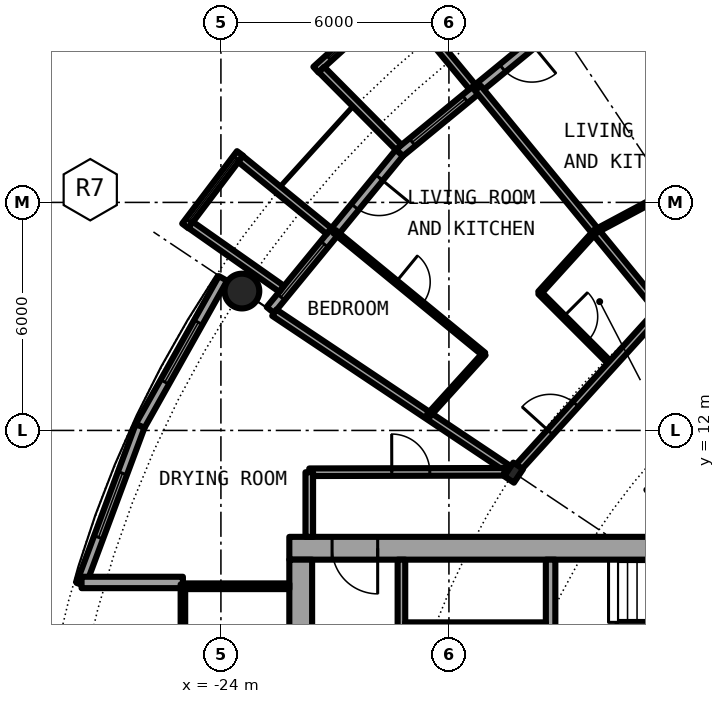
"""IFC4 building model, lengths in metres.
Left out: names, types, materials, properties, quantities, classifications, styles, units other than length and angle.
Written with IfcOpenShell. Run it as: python <this file> out.ifc"""

import sys

from ifc_helpers import new_model, si_unit, direction, frame, frame_2d, origin, origin_2d, place, context, subcontext, project, spatial, rectangle, circle, hollow_circle, i_section, extrude, element, fill, save


model = new_model("IFC4")
c1 = context("Model", 3, precision=1e-05, world=origin(), true_north=direction((0.0, 1.0)))
c2 = subcontext(c1, "Body", "Model", "MODEL_VIEW")
j1 = project(units=[si_unit("LENGTHUNIT", "METRE"), si_unit("PLANEANGLEUNIT", "RADIAN")], contexts=[c1])
p1 = place(None, origin())
s1 = spatial("IfcSite", under=j1, at=p1, CompositionType="ELEMENT")
p2 = place(p1, origin())
s2 = spatial("IfcBuilding", under=s1, at=p2, CompositionType="ELEMENT")
p3 = place(p2, frame((0.0, 0.0, 123.85)))
s3 = spatial("IfcBuildingStorey", under=s2, at=p3, CompositionType="ELEMENT", Elevation=123.85)
p4 = place(p3, frame((-23.448, 15.667, 0.0), z_axis=(0.0, 0.0, 1.0), x_axis=(1.0, 0.0, 0.0)))
e1 = element("IfcColumn", 1, at=p4, inside=s3, PredefinedType="COLUMN", context=c2, shape_type="SweptSolid", body=[
    extrude(hollow_circle(Radius=0.457, WallThickness=0.04, at=origin_2d()), origin(), (0.0, 0.0, 1.0), 3.05),
])
p5 = place(p3, frame((-16.297, 10.889, 0.0), z_axis=(0.0, 0.0, 1.0), x_axis=(-0.831469612303, 0.55557023302, 0.0)))
e2 = element("IfcColumn", 2, at=p5, inside=s3, PredefinedType="COLUMN", context=c2, shape_type="SweptSolid", body=[
    extrude(i_section(OverallWidth=0.307, OverallDepth=0.432, WebThickness=0.021, FlangeThickness=0.04, FilletRadius=0.027, at=origin_2d()), origin(), (0.0, 0.0, 1.0), 3.05),
])
p6 = place(p3, frame((-15.167, 22.699, 0.0), z_axis=(0.0, 0.0, 1.0), x_axis=(-0.773019449054, -0.634382322723, 0.0)))
e3 = element("IfcWall", 3, at=p6, inside=s3, PredefinedType="SOLIDWALL", context=c2, shape_type="SweptSolid", body=[
    extrude(rectangle(XDim=5.352, YDim=0.25, at=frame_2d((2.676, 0.0))), origin(), (0.0, 0.0, 1.0), 2.7),
])
p7 = place(p6, frame((0.841, 0.0, 0.0)))
e4 = element("IfcOpeningElement", 4, at=p7, cuts=e3, PredefinedType="OPENING", context=c2, shape_type="SweptSolid", body=[
    extrude(rectangle(XDim=1.0, YDim=2.2, at=frame_2d((0.5, 1.1))), frame((0.0, 0.135, 0.0), z_axis=(0.0, -1.0, 0.0), x_axis=(1.0, 0.0, 0.0)), (0.0, 0.0, 1.0), 0.27),
])
p8 = place(p6, frame((3.111, 0.0, 0.3)))
e5 = element("IfcOpeningElement", 5, at=p8, cuts=e3, PredefinedType="OPENING", context=c2, shape_type="SweptSolid", body=[
    extrude(rectangle(XDim=1.8, YDim=2.1, at=frame_2d((0.9, 1.05))), frame((0.0, 0.135, 0.0), z_axis=(0.0, -1.0, 0.0), x_axis=(1.0, 0.0, 0.0)), (0.0, 0.0, 1.0), 0.27),
])
p9 = place(p3, frame((-19.282, 23.503, -0.03), z_axis=(0.0, 0.0, 1.0), x_axis=(-0.740998365753, -0.671506829416, 0.0)))
e6 = element("IfcWall", 6, at=p9, inside=s3, PredefinedType="SOLIDWALL", context=c2, shape_type="SweptSolid", body=[
    extrude(rectangle(XDim=2.993, YDim=0.2, at=frame_2d((1.497, 0.0))), origin(), (0.0, 0.0, 1.0), 2.73),
])
p10 = place(p9, frame((0.457, 0.0, 0.33)))
e7 = element("IfcOpeningElement", 7, at=p10, cuts=e6, PredefinedType="OPENING", context=c2, shape_type="SweptSolid", body=[
    extrude(circle(Radius=1.04, at=frame_2d((1.04, 1.04))), frame((0.0, 0.11, 0.0), z_axis=(0.0, -1.0, 0.0), x_axis=(1.0, 0.0, 0.0)), (0.0, 0.0, 1.0), 0.22),
])
p11 = place(p3, frame((-17.384, 21.041, -0.03), z_axis=(0.0, 0.0, 1.0), x_axis=(-0.63709551667, 0.770784861449, 0.0)))
e8 = element("IfcWall", 8, at=p11, inside=s3, PredefinedType="SOLIDWALL", context=c2, shape_type="SweptSolid", body=[
    extrude(rectangle(XDim=3.006, YDim=0.2, at=frame_2d((1.503, 0.0))), origin(), (0.0, 0.0, 1.0), 2.73),
])
p12 = place(p3, frame((-19.323, 19.45, -0.03), z_axis=(0.0, 0.0, 1.0), x_axis=(-0.704476739375, 0.709727076896, 0.0)))
e9 = element("IfcWall", 9, at=p12, inside=s3, PredefinedType="SOLIDWALL", context=c2, shape_type="SweptSolid", body=[
    extrude(rectangle(XDim=2.883, YDim=0.2, at=frame_2d((1.441, 0.0))), origin(), (0.0, 0.0, 1.0), 2.73),
])
p13 = place(p3, frame((-19.304, 19.304, 0.0), z_axis=(0.0, 0.0, 1.0), x_axis=(-0.634382322723, -0.773019449054, 0.0)))
e10 = element("IfcWall", 10, at=p13, inside=s3, PredefinedType="SOLIDWALL", context=c2, shape_type="SweptSolid", body=[
    extrude(rectangle(XDim=5.352, YDim=0.25, at=frame_2d((2.676, 0.0))), origin(), (0.0, 0.0, 1.0), 2.7),
])
p14 = place(p13, frame((0.841, 0.0, 0.0)))
e11 = element("IfcOpeningElement", 11, at=p14, cuts=e10, PredefinedType="OPENING", context=c2, shape_type="SweptSolid", body=[
    extrude(rectangle(XDim=1.0, YDim=2.2, at=frame_2d((0.5, 1.1))), frame((0.0, 0.135, 0.0), z_axis=(0.0, -1.0, 0.0), x_axis=(1.0, 0.0, 0.0)), (0.0, 0.0, 1.0), 0.27),
])
p15 = place(p13, frame((3.111, 0.0, 0.3)))
e12 = element("IfcOpeningElement", 12, at=p15, cuts=e10, PredefinedType="OPENING", context=c2, shape_type="SweptSolid", body=[
    extrude(rectangle(XDim=1.8, YDim=2.1, at=frame_2d((0.9, 1.05))), frame((0.0, 0.135, 0.0), z_axis=(0.0, -1.0, 0.0), x_axis=(1.0, 0.0, 0.0)), (0.0, 0.0, 1.0), 0.27),
])
p16 = place(p3, frame((-23.497, 19.289, -0.03), z_axis=(0.0, 0.0, 1.0), x_axis=(-0.603375996329, -0.797456837111, 0.0)))
e13 = element("IfcWall", 13, at=p16, inside=s3, PredefinedType="SOLIDWALL", context=c2, shape_type="SweptSolid", body=[
    extrude(rectangle(XDim=2.391, YDim=0.2, at=frame_2d((1.196, 0.0))), origin(), (0.0, 0.0, 1.0), 2.73),
])
p17 = place(p16, frame((0.156, 0.0, 0.33)))
e14 = element("IfcOpeningElement", 14, at=p17, cuts=e13, PredefinedType="OPENING", context=c2, shape_type="SweptSolid", body=[
    extrude(circle(Radius=1.04, at=frame_2d((1.04, 1.04))), frame((0.0, 0.11, 0.0), z_axis=(0.0, -1.0, 0.0), x_axis=(1.0, 0.0, 0.0)), (0.0, 0.0, 1.0), 0.22),
])
p18 = place(p3, frame((-21.155, 17.246, -0.03), z_axis=(0.0, 0.0, 1.0), x_axis=(-0.775179004516, 0.631741648902, 0.0)))
e15 = element("IfcWall", 15, at=p18, inside=s3, PredefinedType="SOLIDWALL", context=c2, shape_type="SweptSolid", body=[
    extrude(rectangle(XDim=3.006, YDim=0.2, at=frame_2d((1.503, 0.0))), origin(), (0.0, 0.0, 1.0), 2.73),
])
p19 = place(p3, frame((-22.402, 15.726, -0.03), z_axis=(0.0, 0.0, 1.0), x_axis=(-0.818275399393, 0.574826383135, 0.0)))
e16 = element("IfcWall", 16, at=p19, inside=s3, PredefinedType="SOLIDWALL", context=c2, shape_type="SweptSolid", body=[
    extrude(rectangle(XDim=2.929, YDim=0.2, at=frame_2d((1.465, 0.0))), origin(), (0.0, 0.0, 1.0), 2.73),
])
p20 = place(p3, frame((-23.946, 16.0, 0.0), z_axis=(0.0, 0.0, 1.0), x_axis=(-0.489696356642, -0.871893042919, 0.0)))
e17 = element("IfcWall", 17, at=p20, inside=s3, PredefinedType="SOLIDWALL", context=c2, shape_type="SweptSolid", body=[
    extrude(rectangle(XDim=4.454, YDim=0.25, at=frame_2d((2.227, 0.0))), origin(), (0.0, 0.0, 1.0), 2.7),
])
p21 = place(p20, frame((1.327, 0.0, 0.3)))
e18 = element("IfcOpeningElement", 18, at=p21, cuts=e17, PredefinedType="OPENING", context=c2, shape_type="SweptSolid", body=[
    extrude(rectangle(XDim=1.8, YDim=2.1, at=frame_2d((0.9, 1.05))), frame((0.0, 0.135, 0.0), z_axis=(0.0, -1.0, 0.0), x_axis=(1.0, 0.0, 0.0)), (0.0, 0.0, 1.0), 0.27),
])
p22 = place(p3, frame((-26.127, 12.117, 0.0), z_axis=(0.0, 0.0, 1.0), x_axis=(-0.349247811493, -0.937030397675, 0.0)))
e19 = element("IfcWall", 19, at=p22, inside=s3, PredefinedType="SOLIDWALL", context=c2, shape_type="SweptSolid", body=[
    extrude(rectangle(XDim=4.452, YDim=0.25, at=frame_2d((2.226, 0.0))), origin(), (0.0, 0.0, 1.0), 2.7),
])
p23 = place(p22, frame((1.327, 0.0, 0.3)))
e20 = element("IfcOpeningElement", 20, at=p23, cuts=e19, PredefinedType="OPENING", context=c2, shape_type="SweptSolid", body=[
    extrude(rectangle(XDim=1.8, YDim=2.1, at=frame_2d((0.9, 1.05))), frame((0.0, 0.135, 0.0), z_axis=(0.0, -1.0, 0.0), x_axis=(1.0, 0.0, 0.0)), (0.0, 0.0, 1.0), 0.27),
])
p24 = place(p3, frame((-25.0, 8.0, 0.0), z_axis=(0.0, 0.0, 1.0), x_axis=(-1.0, 0.0, 0.0)))
e21 = element("IfcWall", 21, at=p24, inside=s3, PredefinedType="SOLIDWALL", context=c2, shape_type="SweptSolid", body=[
    extrude(rectangle(XDim=2.667, YDim=0.3, at=frame_2d((1.333, 0.0))), origin(), (0.0, 0.0, 1.0), 2.7),
])
p25 = place(p3, frame((-8.4, 8.9, 0.0), z_axis=(0.0, 0.0, 1.0), x_axis=(-1.0, 0.0, 0.0)))
e22 = element("IfcWall", 22, at=p25, inside=s3, PredefinedType="SHEAR", context=c2, shape_type="SweptSolid", body=[
    extrude(rectangle(XDim=13.8, YDim=0.6, at=frame_2d((6.9, 0.0))), origin(), (0.0, 0.0, 1.0), 3.05),
])
p26 = place(p25, frame((11.475, 0.0, 0.0)))
e23 = element("IfcOpeningElement", 23, at=p26, cuts=e22, PredefinedType="OPENING", context=c2, shape_type="SweptSolid", body=[
    extrude(rectangle(XDim=1.2, YDim=2.3, at=frame_2d((0.6, 1.15))), frame((0.0, 0.31, 0.0), z_axis=(0.0, -1.0, 0.0), x_axis=(1.0, 0.0, 0.0)), (0.0, 0.0, 1.0), 0.62),
])
p27 = place(p3, frame((-21.9, -8.6, 0.0), z_axis=(0.0, 0.0, 1.0), x_axis=(0.0, 1.0, 0.0)))
e24 = element("IfcWall", 24, at=p27, inside=s3, PredefinedType="SHEAR", context=c2, shape_type="SweptSolid", body=[
    extrude(rectangle(XDim=17.2, YDim=0.6, at=frame_2d((8.6, 0.0))), origin(), (0.0, 0.0, 1.0), 3.05),
])
p28 = place(p27, frame((7.7, 0.0, 0.0)))
e25 = element("IfcOpeningElement", 25, at=p28, cuts=e24, PredefinedType="OPENING", context=c2, shape_type="SweptSolid", body=[
    extrude(rectangle(XDim=1.8, YDim=2.3, at=frame_2d((0.9, 1.15))), frame((0.0, 0.31, 0.0), z_axis=(0.0, -1.0, 0.0), x_axis=(1.0, 0.0, 0.0)), (0.0, 0.0, 1.0), 0.62),
])
p29 = place(p3, frame((-15.325, 8.6, 0.0), z_axis=(0.0, 0.0, 1.0), x_axis=(0.0, -1.0, 0.0)))
e26 = element("IfcWall", 26, at=p29, inside=s3, PredefinedType="SHEAR", context=c2, shape_type="SweptSolid", body=[
    extrude(rectangle(XDim=3.95, YDim=0.25, at=frame_2d((1.975, 0.0))), origin(), (0.0, 0.0, 1.0), 3.05),
])
p30 = place(p29, frame((2.025, 0.0, 0.0)))
e27 = element("IfcOpeningElement", 27, at=p30, cuts=e26, PredefinedType="OPENING", context=c2, shape_type="SweptSolid", body=[
    extrude(rectangle(XDim=1.2, YDim=2.3, at=frame_2d((0.6, 1.15))), frame((0.0, 0.135, 0.0), z_axis=(0.0, -1.0, 0.0), x_axis=(1.0, 0.0, 0.0)), (0.0, 0.0, 1.0), 0.27),
])
p31 = place(p3, frame((-19.25, 8.6, 0.0), z_axis=(0.0, 0.0, 1.0), x_axis=(0.0, -1.0, 0.0)))
e28 = element("IfcWall", 28, at=p31, inside=s3, PredefinedType="SOLIDWALL", context=c2, shape_type="SweptSolid", body=[
    extrude(rectangle(XDim=7.025, YDim=0.2, at=frame_2d((3.513, 0.0))), origin(), (0.0, 0.0, 1.0), 2.7),
])
p32 = place(p31, frame((2.35, 0.0, 0.0)))
e29 = element("IfcOpeningElement", 29, at=p32, cuts=e28, PredefinedType="OPENING", context=c2, shape_type="SweptSolid", body=[
    extrude(rectangle(XDim=1.1, YDim=2.3, at=frame_2d((0.55, 1.15))), frame((0.0, 0.11, 0.0), z_axis=(0.0, -1.0, 0.0), x_axis=(1.0, 0.0, 0.0)), (0.0, 0.0, 1.0), 0.22),
])
p33 = place(p3, frame((-15.45, 6.875, 0.0), z_axis=(0.0, 0.0, 1.0), x_axis=(-1.0, 0.0, 0.0)))
e30 = element("IfcWall", 30, at=p33, inside=s3, PredefinedType="PARTITIONING", context=c2, shape_type="SweptSolid", body=[
    extrude(rectangle(XDim=3.7, YDim=0.15, at=frame_2d((1.85, 0.0))), origin(), (0.0, 0.0, 1.0), 2.7),
])
p34 = place(p33, frame((1.4, 0.0, 0.0)))
e31 = element("IfcOpeningElement", 31, at=p34, cuts=e30, PredefinedType="OPENING", context=c2, shape_type="SweptSolid", body=[
    extrude(rectangle(XDim=0.9, YDim=2.3, at=frame_2d((0.45, 1.15))), frame((0.0, 0.085, 0.0), z_axis=(0.0, -1.0, 0.0), x_axis=(1.0, 0.0, 0.0)), (0.0, 0.0, 1.0), 0.17),
])
p35 = place(p3, frame((-22.2, 7.9, 0.0), z_axis=(0.0, 0.0, 1.0), x_axis=(-1.0, 0.0, 0.0)))
e32 = element("IfcWall", 32, at=p35, inside=s3, PredefinedType="PARTITIONING", context=c2, shape_type="SweptSolid", body=[
    extrude(rectangle(XDim=2.74, YDim=0.15, at=frame_2d((1.37, 0.0))), origin(), (0.0, 0.0, 1.0), 2.7),
])
p36 = place(p3, frame((-25.0, 7.95, 0.0), z_axis=(0.0, 0.0, 1.0), x_axis=(0.0, -1.0, 0.0)))
e33 = element("IfcWall", 33, at=p36, inside=s3, PredefinedType="PARTITIONING", context=c2, shape_type="SweptSolid", body=[
    extrude(rectangle(XDim=15.9, YDim=0.12, at=frame_2d((7.95, 0.0))), origin(), (0.0, 0.0, 1.0), 2.7),
])
p37 = place(p36, frame((0.95, 0.0, 0.1)))
e34 = element("IfcOpeningElement", 34, at=p37, cuts=e33, PredefinedType="OPENING", context=c2, shape_type="SweptSolid", body=[
    extrude(rectangle(XDim=14.0, YDim=2.35, at=frame_2d((7.0, 1.175))), frame((0.0, 0.07, 0.0), z_axis=(0.0, -1.0, 0.0), x_axis=(1.0, 0.0, 0.0)), (0.0, 0.0, 1.0), 0.14),
])
p38 = place(p3, frame((-22.595, 15.098, 0.0), z_axis=(0.0, 0.0, 1.0), x_axis=(0.831406593008, -0.555664536482, 0.0)))
e35 = element("IfcWall", 35, at=p38, inside=s3, PredefinedType="PARTITIONING", context=c2, shape_type="SweptSolid", body=[
    extrude(rectangle(XDim=7.358, YDim=0.2, at=frame_2d((3.679, 0.0))), origin(), (0.0, 0.0, 1.0), 2.7),
])
p39 = place(p3, frame((-21.012, 17.233, 0.0), z_axis=(0.0, 0.0, 1.0), x_axis=(0.77326214499, -0.634086472908, 0.0)))
e36 = element("IfcWall", 36, at=p39, inside=s3, PredefinedType="PARTITIONING", context=c2, shape_type="SweptSolid", body=[
    extrude(rectangle(XDim=5.089, YDim=0.1, at=frame_2d((2.544, 0.0))), origin(), (0.0, 0.0, 1.0), 2.7),
])
p40 = place(p39, frame((2.094, 0.0, 0.0)))
e37 = element("IfcOpeningElement", 37, at=p40, cuts=e36, PredefinedType="OPENING", context=c2, shape_type="SweptSolid", body=[
    extrude(rectangle(XDim=0.9, YDim=2.3, at=frame_2d((0.45, 1.15))), frame((0.0, 0.06, 0.0), z_axis=(0.0, -1.0, 0.0), x_axis=(1.0, 0.0, 0.0)), (0.0, 0.0, 1.0), 0.12),
])
p41 = place(p3, frame((-17.24, 21.007, 0.0), z_axis=(0.0, 0.0, 1.0), x_axis=(0.634381303318, -0.773020285633, 0.0)))
e38 = element("IfcWall", 38, at=p41, inside=s3, PredefinedType="PARTITIONING", context=c2, shape_type="SweptSolid", body=[
    extrude(rectangle(XDim=7.576, YDim=0.2, at=frame_2d((3.788, 0.0))), origin(), (0.0, 0.0, 1.0), 2.7),
])
p42 = place(p3, frame((-15.612, 15.622, 0.0), z_axis=(0.0, 0.0, 1.0), x_axis=(0.706741540154, -0.707471833659, 0.0)))
e39 = element("IfcWall", 39, at=p42, inside=s3, PredefinedType="PARTITIONING", context=c2, shape_type="SweptSolid", body=[
    extrude(rectangle(XDim=2.674, YDim=0.1, at=frame_2d((1.337, 0.0))), origin(), (0.0, 0.0, 1.0), 2.7),
])
p43 = place(p42, frame((0.887, 0.0, 0.0)))
e40 = element("IfcOpeningElement", 40, at=p43, cuts=e39, PredefinedType="OPENING", context=c2, shape_type="SweptSolid", body=[
    extrude(rectangle(XDim=0.9, YDim=2.3, at=frame_2d((0.45, 1.15))), frame((0.0, 0.06, 0.0), z_axis=(0.0, -1.0, 0.0), x_axis=(1.0, 0.0, 0.0)), (0.0, 0.0, 1.0), 0.12),
])
p44 = place(p3, frame((-12.81, 23.966, 0.0), z_axis=(0.0, 0.0, 1.0), x_axis=(0.47140999111, -0.881914179658, 0.0)))
e41 = element("IfcWall", 41, at=p44, inside=s3, PredefinedType="PARTITIONING", context=c2, shape_type="SweptSolid", body=[
    extrude(rectangle(XDim=5.303, YDim=0.1, at=frame_2d((2.652, 0.0))), origin(), (0.0, 0.0, 1.0), 2.7),
])
p45 = place(p44, frame((2.202, 0.0, 0.0)))
e42 = element("IfcOpeningElement", 42, at=p45, cuts=e41, PredefinedType="OPENING", context=c2, shape_type="SweptSolid", body=[
    extrude(rectangle(XDim=0.9, YDim=2.3, at=frame_2d((0.45, 1.15))), frame((0.0, 0.06, 0.0), z_axis=(0.0, -1.0, 0.0), x_axis=(1.0, 0.0, 0.0)), (0.0, 0.0, 1.0), 0.12),
])
p46 = place(p3, frame((-21.675, 10.9, 0.0), z_axis=(0.0, 0.0, 1.0), x_axis=(0.999997173357, 0.002377662213, 0.0)))
e43 = element("IfcWall", 43, at=p46, inside=s3, PredefinedType="PARTITIONING", context=c2, shape_type="SweptSolid", body=[
    extrude(rectangle(XDim=5.134, YDim=0.2, at=frame_2d((2.567, 0.0))), origin(), (0.0, 0.0, 1.0), 2.7),
])
p47 = place(p46, frame((2.171, 0.0, 0.0)))
e44 = element("IfcOpeningElement", 44, at=p47, cuts=e43, PredefinedType="OPENING", context=c2, shape_type="SweptSolid", body=[
    extrude(rectangle(XDim=1.0, YDim=2.3, at=frame_2d((0.5, 1.15))), frame((0.0, 0.11, 0.0), z_axis=(0.0, -1.0, 0.0), x_axis=(1.0, 0.0, 0.0)), (0.0, 0.0, 1.0), 0.22),
])
p48 = place(p3, frame((-16.192, 11.004, 0.0), z_axis=(0.0, 0.0, 1.0), x_axis=(0.671481997275, 0.741020868354, 0.0)))
e45 = element("IfcWall", 45, at=p48, inside=s3, PredefinedType="PARTITIONING", context=c2, shape_type="SweptSolid", body=[
    extrude(rectangle(XDim=5.596, YDim=0.2, at=frame_2d((2.798, 0.0))), origin(), (0.0, 0.0, 1.0), 2.39),
])
p49 = place(p48, frame((1.277, 0.0, 0.0)))
e46 = element("IfcOpeningElement", 46, at=p49, cuts=e45, PredefinedType="OPENING", context=c2, shape_type="SweptSolid", body=[
    extrude(rectangle(XDim=1.0, YDim=2.3, at=frame_2d((0.5, 1.15))), frame((0.0, 0.11, 0.0), z_axis=(0.0, -1.0, 0.0), x_axis=(1.0, 0.0, 0.0)), (0.0, 0.0, 1.0), 0.22),
])
p50 = place(p3, frame((-21.675, 9.2, 0.0), z_axis=(0.0, 0.0, 1.0), x_axis=(0.0, 1.0, 0.0)))
e47 = element("IfcWall", 47, at=p50, inside=s3, PredefinedType="PARTITIONING", context=c2, shape_type="SweptSolid", body=[
    extrude(rectangle(XDim=1.7, YDim=0.2, at=frame_2d((0.85, 0.0))), origin(), (0.0, 0.0, 1.0), 2.7),
])
p51 = place(p3, frame((-14.141, 17.241, 0.0), z_axis=(0.0, 0.0, 1.0), x_axis=(0.881765102974, 0.47168877788, 0.0)))
e48 = element("IfcWall", 48, at=p51, inside=s3, PredefinedType="PARTITIONING", context=c2, shape_type="SweptSolid", body=[
    extrude(rectangle(XDim=2.176, YDim=0.1, at=frame_2d((1.088, 0.0))), origin(), (0.0, 0.0, 1.0), 2.7),
])
for number, where, z_axis, x_axis in (
    (49, (-18.538, 12.394, 0.0), (0.0, 0.0, 1.0), (0.672, 0.741, 0.0)),
    (50, (-15.613, 15.621, 0.0), (0.0, 0.0, 1.0), (0.672, 0.741, 0.0)),
):
    element("IfcWall", number, at=place(p3, frame(where, z_axis=z_axis, x_axis=x_axis)), inside=s3, PredefinedType="PARTITIONING", context=c2, shape_type="SweptSolid", body=[
        extrude(rectangle(XDim=2.183, YDim=0.1, at=frame_2d((1.091, 0.0))), origin(), (0.0, 0.0, 1.0), 2.7),
    ])
p52 = place(p7, origin())
e51 = element("IfcDoor", 51, at=p52, inside=s3, OperationType="SINGLE_SWING_LEFT", PredefinedType="DOOR", context=c2, shape_type="SweptSolid", body=[
    extrude(rectangle(XDim=1.0, YDim=2.2, at=frame_2d((0.5, 1.1))), frame((0.0, 0.025, 0.0), z_axis=(0.0, -1.0, 0.0), x_axis=(1.0, 0.0, 0.0)), (0.0, 0.0, 1.0), 0.05),
])
fill(e4, e51)
p53 = place(p8, origin())
e52 = element("IfcWindow", 52, at=p53, inside=s3, PartitioningType="SINGLE_PANEL", PredefinedType="WINDOW", context=c2, shape_type="SweptSolid", body=[
    extrude(rectangle(XDim=1.8, YDim=2.1, at=frame_2d((0.9, 1.05))), frame((0.0, 0.03, 0.0), z_axis=(0.0, -1.0, 0.0), x_axis=(1.0, 0.0, 0.0)), (0.0, 0.0, 1.0), 0.06),
])
fill(e5, e52)
p54 = place(p10, origin())
e53 = element("IfcWindow", 53, at=p54, inside=s3, PartitioningType="SINGLE_PANEL", PredefinedType="WINDOW", context=c2, shape_type="SweptSolid", body=[
    extrude(circle(Radius=1.04, at=frame_2d((1.04, 1.04))), frame((0.0, 0.03, 0.0), z_axis=(0.0, -1.0, 0.0), x_axis=(1.0, 0.0, 0.0)), (0.0, 0.0, 1.0), 0.06),
])
fill(e7, e53)
p55 = place(p14, origin())
e54 = element("IfcDoor", 54, at=p55, inside=s3, OperationType="SINGLE_SWING_LEFT", PredefinedType="DOOR", context=c2, shape_type="SweptSolid", body=[
    extrude(rectangle(XDim=1.0, YDim=2.2, at=frame_2d((0.5, 1.1))), frame((0.0, 0.025, 0.0), z_axis=(0.0, -1.0, 0.0), x_axis=(1.0, 0.0, 0.0)), (0.0, 0.0, 1.0), 0.05),
])
fill(e11, e54)
p56 = place(p15, origin())
e55 = element("IfcWindow", 55, at=p56, inside=s3, PartitioningType="SINGLE_PANEL", PredefinedType="WINDOW", context=c2, shape_type="SweptSolid", body=[
    extrude(rectangle(XDim=1.8, YDim=2.1, at=frame_2d((0.9, 1.05))), frame((0.0, 0.03, 0.0), z_axis=(0.0, -1.0, 0.0), x_axis=(1.0, 0.0, 0.0)), (0.0, 0.0, 1.0), 0.06),
])
fill(e12, e55)
p57 = place(p17, origin())
e56 = element("IfcWindow", 56, at=p57, inside=s3, PartitioningType="SINGLE_PANEL", PredefinedType="WINDOW", context=c2, shape_type="SweptSolid", body=[
    extrude(circle(Radius=1.04, at=frame_2d((1.04, 1.04))), frame((0.0, 0.03, 0.0), z_axis=(0.0, -1.0, 0.0), x_axis=(1.0, 0.0, 0.0)), (0.0, 0.0, 1.0), 0.06),
])
fill(e14, e56)
p58 = place(p21, origin())
e57 = element("IfcWindow", 57, at=p58, inside=s3, PartitioningType="SINGLE_PANEL", PredefinedType="WINDOW", context=c2, shape_type="SweptSolid", body=[
    extrude(rectangle(XDim=1.8, YDim=2.1, at=frame_2d((0.9, 1.05))), frame((0.0, 0.03, 0.0), z_axis=(0.0, -1.0, 0.0), x_axis=(1.0, 0.0, 0.0)), (0.0, 0.0, 1.0), 0.06),
])
fill(e18, e57)
p59 = place(p23, origin())
e58 = element("IfcWindow", 58, at=p59, inside=s3, PartitioningType="SINGLE_PANEL", PredefinedType="WINDOW", context=c2, shape_type="SweptSolid", body=[
    extrude(rectangle(XDim=1.8, YDim=2.1, at=frame_2d((0.9, 1.05))), frame((0.0, 0.03, 0.0), z_axis=(0.0, -1.0, 0.0), x_axis=(1.0, 0.0, 0.0)), (0.0, 0.0, 1.0), 0.06),
])
fill(e20, e58)
p60 = place(p34, origin())
e59 = element("IfcDoor", 59, at=p60, inside=s3, OperationType="SINGLE_SWING_LEFT", PredefinedType="DOOR", context=c2, shape_type="SweptSolid", body=[
    extrude(rectangle(XDim=0.9, YDim=2.3, at=frame_2d((0.45, 1.15))), frame((0.0, 0.025, 0.0), z_axis=(0.0, -1.0, 0.0), x_axis=(1.0, 0.0, 0.0)), (0.0, 0.0, 1.0), 0.05),
])
fill(e31, e59)
p61 = place(p26, origin())
e60 = element("IfcDoor", 60, at=p61, inside=s3, OperationType="SINGLE_SWING_LEFT", PredefinedType="DOOR", context=c2, shape_type="SweptSolid", body=[
    extrude(rectangle(XDim=1.2, YDim=2.3, at=frame_2d((0.6, 1.15))), frame((0.0, 0.025, 0.0), z_axis=(0.0, -1.0, 0.0), x_axis=(1.0, 0.0, 0.0)), (0.0, 0.0, 1.0), 0.05),
])
fill(e23, e60)
p62 = place(p37, origin())
e61 = element("IfcWindow", 61, at=p62, inside=s3, PartitioningType="SINGLE_PANEL", PredefinedType="WINDOW", context=c2, shape_type="SweptSolid", body=[
    extrude(rectangle(XDim=14.0, YDim=2.35, at=frame_2d((7.0, 1.175))), frame((0.0, 0.03, 0.0), z_axis=(0.0, -1.0, 0.0), x_axis=(1.0, 0.0, 0.0)), (0.0, 0.0, 1.0), 0.06),
])
fill(e34, e61)
p63 = place(p49, origin())
e62 = element("IfcDoor", 62, at=p63, inside=s3, OperationType="SINGLE_SWING_LEFT", PredefinedType="DOOR", context=c2, shape_type="SweptSolid", body=[
    extrude(rectangle(XDim=1.0, YDim=2.3, at=frame_2d((0.5, 1.15))), frame((0.0, 0.025, 0.0), z_axis=(0.0, -1.0, 0.0), x_axis=(1.0, 0.0, 0.0)), (0.0, 0.0, 1.0), 0.05),
])
fill(e46, e62)
p64 = place(p43, origin())
e63 = element("IfcDoor", 63, at=p64, inside=s3, OperationType="SINGLE_SWING_RIGHT", PredefinedType="DOOR", context=c2, shape_type="SweptSolid", body=[
    extrude(rectangle(XDim=0.9, YDim=2.3, at=frame_2d((0.45, 1.15))), frame((0.0, 0.025, 0.0), z_axis=(0.0, -1.0, 0.0), x_axis=(1.0, 0.0, 0.0)), (0.0, 0.0, 1.0), 0.05),
])
fill(e40, e63)
p65 = place(p40, origin())
e64 = element("IfcDoor", 64, at=p65, inside=s3, OperationType="SINGLE_SWING_RIGHT", PredefinedType="DOOR", context=c2, shape_type="SweptSolid", body=[
    extrude(rectangle(XDim=0.9, YDim=2.3, at=frame_2d((0.45, 1.15))), frame((0.0, 0.025, 0.0), z_axis=(0.0, -1.0, 0.0), x_axis=(1.0, 0.0, 0.0)), (0.0, 0.0, 1.0), 0.05),
])
fill(e37, e64)
p66 = place(p47, origin())
e65 = element("IfcDoor", 65, at=p66, inside=s3, OperationType="SINGLE_SWING_RIGHT", PredefinedType="DOOR", context=c2, shape_type="SweptSolid", body=[
    extrude(rectangle(XDim=1.0, YDim=2.3, at=frame_2d((0.5, 1.15))), frame((0.0, 0.025, 0.0), z_axis=(0.0, -1.0, 0.0), x_axis=(1.0, 0.0, 0.0)), (0.0, 0.0, 1.0), 0.05),
])
fill(e44, e65)
save(model, sys.argv[1])
